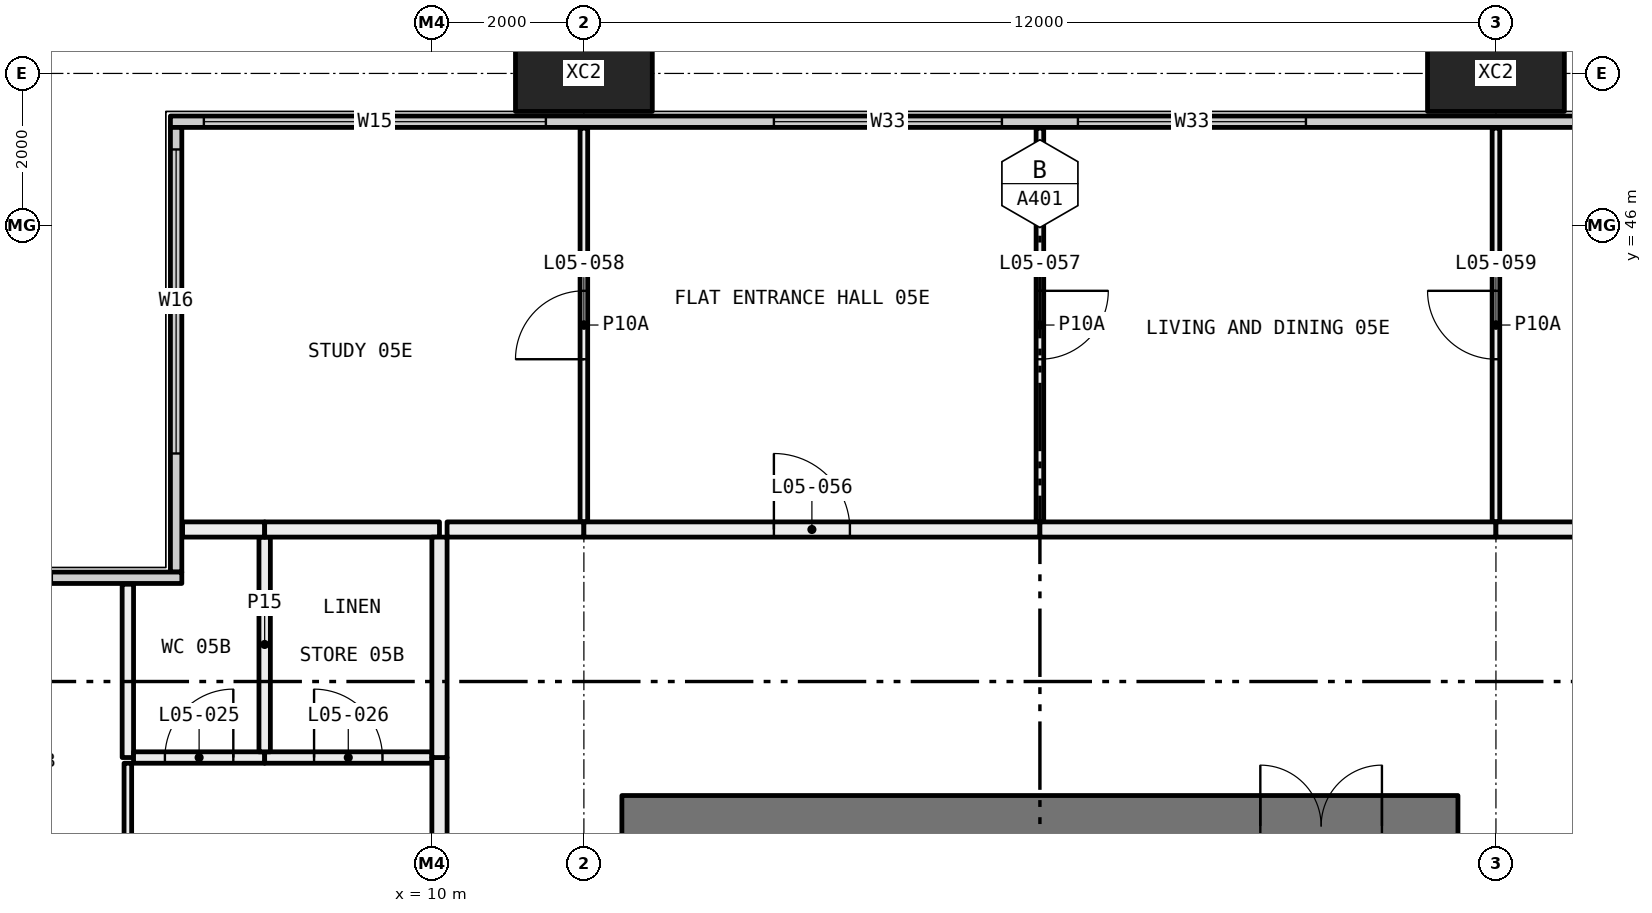
"""IFC4 building model, lengths in metres.
Left out: names, types, materials, properties, quantities, classifications, styles, units other than length and angle.
Written with IfcOpenShell. Run it as: python <this file> out.ifc"""

import sys

from ifc_helpers import new_model, si_unit, direction, frame, frame_2d, origin, origin_2d, place, context, subcontext, project, spatial, rectangle, hollow_rectangle, extrude, element, fill, save


model = new_model("IFC4")
c1 = context("Model", 3, precision=1e-05, world=origin(), true_north=direction((0.0, 1.0)))
c2 = subcontext(c1, "Body", "Model", "MODEL_VIEW")
j1 = project(units=[si_unit("LENGTHUNIT", "METRE"), si_unit("PLANEANGLEUNIT", "RADIAN")], contexts=[c1])
p1 = place(None, origin())
s1 = spatial("IfcSite", under=j1, at=p1, CompositionType="ELEMENT")
p2 = place(p1, origin())
s2 = spatial("IfcBuilding", under=s1, at=p2, CompositionType="ELEMENT")
p3 = place(p2, frame((0.0, 0.0, 30.0)))
s3 = spatial("IfcBuildingStorey", under=s2, at=p3, CompositionType="ELEMENT", Elevation=30.0)
for number, where, z_axis, x_axis in (
    (1, (12.0, 48.0, -0.4), (0.0, 0.0, 1.0), (1.0, 0.0, 0.0)),
    (2, (24.0, 48.0, -0.4), (0.0, 0.0, 1.0), (1.0, 0.0, 0.0)),
):
    element("IfcColumn", number, at=place(p3, frame(where, z_axis=z_axis, x_axis=x_axis)), inside=s3, PredefinedType="COLUMN", context=c2, shape_type="SweptSolid", body=[
        extrude(hollow_rectangle(XDim=1.8, YDim=1.0, WallThickness=0.07, at=origin_2d()), origin(), (0.0, 0.0, 1.0), 3.45),
    ])
p4 = place(p3, frame((6.56, 47.365, 0.0), z_axis=(0.0, 0.0, 1.0), x_axis=(1.0, 0.0, 0.0)))
e3 = element("IfcWall", 3, at=p4, inside=s3, PredefinedType="ELEMENTEDWALL", context=c2, shape_type="SweptSolid", body=[
    extrude(rectangle(XDim=58.88, YDim=0.15, at=frame_2d((29.44, 0.0))), origin(), (0.0, 0.0, 1.0), 3.05),
])
p5 = place(p4, frame((0.44, 0.0, 0.45)))
e4 = element("IfcOpeningElement", 4, at=p5, cuts=e3, PredefinedType="OPENING", context=c2, shape_type="SweptSolid", body=[
    extrude(rectangle(XDim=4.5, YDim=2.55, at=frame_2d((2.25, 1.275))), frame((0.0, 0.085, 0.0), z_axis=(0.0, -1.0, 0.0), x_axis=(1.0, 0.0, 0.0)), (0.0, 0.0, 1.0), 0.17),
])
p6 = place(p4, frame((7.94, 0.0, 0.45)))
e5 = element("IfcOpeningElement", 5, at=p6, cuts=e3, PredefinedType="OPENING", context=c2, shape_type="SweptSolid", body=[
    extrude(rectangle(XDim=3.0, YDim=2.55, at=frame_2d((1.5, 1.275))), frame((0.0, 0.085, 0.0), z_axis=(0.0, -1.0, 0.0), x_axis=(1.0, 0.0, 0.0)), (0.0, 0.0, 1.0), 0.17),
])
p7 = place(p4, frame((11.94, 0.0, 0.45)))
e6 = element("IfcOpeningElement", 6, at=p7, cuts=e3, PredefinedType="OPENING", context=c2, shape_type="SweptSolid", body=[
    extrude(rectangle(XDim=3.0, YDim=2.55, at=frame_2d((1.5, 1.275))), frame((0.0, 0.085, 0.0), z_axis=(0.0, -1.0, 0.0), x_axis=(1.0, 0.0, 0.0)), (0.0, 0.0, 1.0), 0.17),
])
p8 = place(p4, frame((19.94, 0.0, 0.45)))
e7 = element("IfcOpeningElement", 7, at=p8, cuts=e3, PredefinedType="OPENING", context=c2, shape_type="SweptSolid", body=[
    extrude(rectangle(XDim=3.0, YDim=2.55, at=frame_2d((1.5, 1.275))), frame((0.0, 0.085, 0.0), z_axis=(0.0, -1.0, 0.0), x_axis=(1.0, 0.0, 0.0)), (0.0, 0.0, 1.0), 0.17),
])
p9 = place(p4, frame((23.94, 0.0, 0.45)))
e8 = element("IfcOpeningElement", 8, at=p9, cuts=e3, PredefinedType="OPENING", context=c2, shape_type="SweptSolid", body=[
    extrude(rectangle(XDim=2.0, YDim=2.55, at=frame_2d((1.0, 1.275))), frame((0.0, 0.085, 0.0), z_axis=(0.0, -1.0, 0.0), x_axis=(1.0, 0.0, 0.0)), (0.0, 0.0, 1.0), 0.17),
])
p10 = place(p4, frame((31.94, 0.0, 0.45)))
e9 = element("IfcOpeningElement", 9, at=p10, cuts=e3, PredefinedType="OPENING", context=c2, shape_type="SweptSolid", body=[
    extrude(rectangle(XDim=3.0, YDim=2.55, at=frame_2d((1.5, 1.275))), frame((0.0, 0.085, 0.0), z_axis=(0.0, -1.0, 0.0), x_axis=(1.0, 0.0, 0.0)), (0.0, 0.0, 1.0), 0.17),
])
p11 = place(p4, frame((35.94, 0.0, 0.45)))
e10 = element("IfcOpeningElement", 10, at=p11, cuts=e3, PredefinedType="OPENING", context=c2, shape_type="SweptSolid", body=[
    extrude(rectangle(XDim=3.0, YDim=2.55, at=frame_2d((1.5, 1.275))), frame((0.0, 0.085, 0.0), z_axis=(0.0, -1.0, 0.0), x_axis=(1.0, 0.0, 0.0)), (0.0, 0.0, 1.0), 0.17),
])
p12 = place(p4, frame((43.94, 0.0, 0.45)))
e11 = element("IfcOpeningElement", 11, at=p12, cuts=e3, PredefinedType="OPENING", context=c2, shape_type="SweptSolid", body=[
    extrude(rectangle(XDim=3.0, YDim=2.55, at=frame_2d((1.5, 1.275))), frame((0.0, 0.085, 0.0), z_axis=(0.0, -1.0, 0.0), x_axis=(1.0, 0.0, 0.0)), (0.0, 0.0, 1.0), 0.17),
])
p13 = place(p4, frame((47.94, 0.0, 0.45)))
e12 = element("IfcOpeningElement", 12, at=p13, cuts=e3, PredefinedType="OPENING", context=c2, shape_type="SweptSolid", body=[
    extrude(rectangle(XDim=2.0, YDim=2.55, at=frame_2d((1.0, 1.275))), frame((0.0, 0.085, 0.0), z_axis=(0.0, -1.0, 0.0), x_axis=(1.0, 0.0, 0.0)), (0.0, 0.0, 1.0), 0.17),
])
p14 = place(p4, frame((53.94, 0.0, 0.45)))
e13 = element("IfcOpeningElement", 13, at=p14, cuts=e3, PredefinedType="OPENING", context=c2, shape_type="SweptSolid", body=[
    extrude(rectangle(XDim=4.5, YDim=2.55, at=frame_2d((2.25, 1.275))), frame((0.0, 0.085, 0.0), z_axis=(0.0, -1.0, 0.0), x_axis=(1.0, 0.0, 0.0)), (0.0, 0.0, 1.0), 0.17),
])
p15 = place(p3, frame((6.635, 41.44, 0.0), z_axis=(0.0, 0.0, 1.0), x_axis=(0.0, 1.0, 0.0)))
e14 = element("IfcWall", 14, at=p15, inside=s3, PredefinedType="ELEMENTEDWALL", context=c2, shape_type="SweptSolid", body=[
    extrude(rectangle(XDim=5.85, YDim=0.15, at=frame_2d((2.925, 0.0))), origin(), (0.0, 0.0, 1.0), 3.05),
])
p16 = place(p15, frame((1.56, 0.0, 0.45)))
e15 = element("IfcOpeningElement", 15, at=p16, cuts=e14, PredefinedType="OPENING", context=c2, shape_type="SweptSolid", body=[
    extrude(rectangle(XDim=4.0, YDim=2.55, at=frame_2d((2.0, 1.275))), frame((0.0, 0.085, 0.0), z_axis=(0.0, -1.0, 0.0), x_axis=(1.0, 0.0, 0.0)), (0.0, 0.0, 1.0), 0.17),
])
p17 = place(p3, frame((0.56, 41.365, 0.0), z_axis=(0.0, 0.0, 1.0), x_axis=(1.0, 0.0, 0.0)))
e16 = element("IfcWall", 16, at=p17, inside=s3, PredefinedType="ELEMENTEDWALL", context=c2, shape_type="SweptSolid", body=[
    extrude(rectangle(XDim=6.15, YDim=0.15, at=frame_2d((3.075, 0.0))), origin(), (0.0, 0.0, 1.0), 3.05),
])
p18 = place(p17, frame((0.44, 0.0, 0.45)))
e17 = element("IfcOpeningElement", 17, at=p18, cuts=e16, PredefinedType="OPENING", context=c2, shape_type="SweptSolid", body=[
    extrude(rectangle(XDim=4.0, YDim=2.55, at=frame_2d((2.0, 1.275))), frame((0.0, 0.085, 0.0), z_axis=(0.0, -1.0, 0.0), x_axis=(1.0, 0.0, 0.0)), (0.0, 0.0, 1.0), 0.17),
])
p19 = place(p3, frame((6.0, 36.05, 0.0), z_axis=(0.0, 0.0, 1.0), x_axis=(0.0, 1.0, 0.0)))
e18 = element("IfcWall", 18, at=p19, inside=s3, PredefinedType="PARTITIONING", context=c2, shape_type="SweptSolid", body=[
    extrude(rectangle(XDim=2.875, YDim=0.1, at=frame_2d((1.438, 0.0))), origin(), (0.0, 0.0, 1.0), 2.45),
])
p20 = place(p3, frame((6.0, 39.0, 0.0), z_axis=(0.0, 0.0, 1.0), x_axis=(0.0, 1.0, 0.0)))
e19 = element("IfcWall", 19, at=p20, inside=s3, PredefinedType="PARTITIONING", context=c2, shape_type="SweptSolid", body=[
    extrude(rectangle(XDim=2.28, YDim=0.15, at=frame_2d((1.14, 0.0))), origin(), (0.0, 0.0, 1.0), 3.05),
])
p21 = place(p3, frame((7.8, 39.0, 0.0), z_axis=(0.0, 0.0, 1.0), x_axis=(-1.0, 0.0, 0.0)))
e20 = element("IfcWall", 20, at=p21, inside=s3, PredefinedType="PARTITIONING", context=c2, shape_type="SweptSolid", body=[
    extrude(rectangle(XDim=1.725, YDim=0.15, at=frame_2d((0.863, 0.0))), origin(), (0.0, 0.0, 1.0), 3.05),
])
p22 = place(p21, frame((0.413, 0.0, 0.0)))
e21 = element("IfcOpeningElement", 21, at=p22, cuts=e20, PredefinedType="OPENING", context=c2, shape_type="SweptSolid", body=[
    extrude(rectangle(XDim=0.9, YDim=2.1, at=frame_2d((0.45, 1.05))), frame((0.0, 0.085, 0.0), z_axis=(0.0, -1.0, 0.0), x_axis=(1.0, 0.0, 0.0)), (0.0, 0.0, 1.0), 0.17),
])
p23 = place(p3, frame((10.0, 39.0, 0.0), z_axis=(0.0, 0.0, 1.0), x_axis=(-1.0, 0.0, 0.0)))
e22 = element("IfcWall", 22, at=p23, inside=s3, PredefinedType="PARTITIONING", context=c2, shape_type="SweptSolid", body=[
    extrude(rectangle(XDim=2.2, YDim=0.15, at=frame_2d((1.1, 0.0))), origin(), (0.0, 0.0, 1.0), 3.05),
])
p24 = place(p23, frame((0.65, 0.0, 0.0)))
e23 = element("IfcOpeningElement", 23, at=p24, cuts=e22, PredefinedType="OPENING", context=c2, shape_type="SweptSolid", body=[
    extrude(rectangle(XDim=0.9, YDim=2.1, at=frame_2d((0.45, 1.05))), frame((0.0, 0.085, 0.0), z_axis=(0.0, -1.0, 0.0), x_axis=(1.0, 0.0, 0.0)), (0.0, 0.0, 1.0), 0.17),
])
p25 = place(p3, frame((10.1, 36.1, 0.0), z_axis=(0.0, 0.0, 1.0), x_axis=(0.0, 1.0, 0.0)))
e24 = element("IfcWall", 24, at=p25, inside=s3, PredefinedType="PARTITIONING", context=c2, shape_type="SweptSolid", body=[
    extrude(rectangle(XDim=2.9, YDim=0.2, at=frame_2d((1.45, 0.0))), origin(), (0.0, 0.0, 1.0), 3.05),
])
p26 = place(p3, frame((7.8, 39.075, 0.0), z_axis=(0.0, 0.0, 1.0), x_axis=(0.0, 1.0, 0.0)))
e25 = element("IfcWall", 25, at=p26, inside=s3, PredefinedType="PARTITIONING", context=c2, shape_type="SweptSolid", body=[
    extrude(rectangle(XDim=2.825, YDim=0.15, at=frame_2d((1.413, 0.0))), origin(), (0.0, 0.0, 1.0), 3.05),
])
p27 = place(p3, frame((7.8, 42.0, 0.0), z_axis=(0.0, 0.0, 1.0), x_axis=(-1.0, 0.0, 0.0)))
e26 = element("IfcWall", 26, at=p27, inside=s3, PredefinedType="PARTITIONING", context=c2, shape_type="SweptSolid", body=[
    extrude(rectangle(XDim=1.08, YDim=0.2, at=frame_2d((0.54, 0.0))), origin(), (0.0, 0.0, 1.0), 3.05),
])
p28 = place(p3, frame((10.1, 42.0, 0.0), z_axis=(0.0, 0.0, 1.0), x_axis=(-1.0, 0.0, 0.0)))
e27 = element("IfcWall", 27, at=p28, inside=s3, PredefinedType="PARTITIONING", context=c2, shape_type="SweptSolid", body=[
    extrude(rectangle(XDim=2.3, YDim=0.2, at=frame_2d((1.15, 0.0))), origin(), (0.0, 0.0, 1.0), 3.05),
])
p29 = place(p3, frame((10.1, 39.0, 0.0), z_axis=(0.0, 0.0, 1.0), x_axis=(0.0, 1.0, 0.0)))
e28 = element("IfcWall", 28, at=p29, inside=s3, PredefinedType="PARTITIONING", context=c2, shape_type="SweptSolid", body=[
    extrude(rectangle(XDim=2.9, YDim=0.2, at=frame_2d((1.45, 0.0))), origin(), (0.0, 0.0, 1.0), 3.05),
])
p30 = place(p3, frame((12.0, 42.1, 0.0), z_axis=(0.0, 0.0, 1.0), x_axis=(0.0, 1.0, 0.0)))
e29 = element("IfcWall", 29, at=p30, inside=s3, PredefinedType="PARTITIONING", context=c2, shape_type="SweptSolid", body=[
    extrude(rectangle(XDim=5.18, YDim=0.1, at=frame_2d((2.59, 0.0))), origin(), (0.0, 0.0, 1.0), 3.05),
])
p31 = place(p30, frame((2.14, 0.0, 0.0)))
e30 = element("IfcOpeningElement", 30, at=p31, cuts=e29, PredefinedType="OPENING", context=c2, shape_type="SweptSolid", body=[
    extrude(rectangle(XDim=0.9, YDim=2.1, at=frame_2d((0.45, 1.05))), frame((0.0, 0.06, 0.0), z_axis=(0.0, -1.0, 0.0), x_axis=(1.0, 0.0, 0.0)), (0.0, 0.0, 1.0), 0.12),
])
p32 = place(p3, frame((10.2, 42.0, 0.0), z_axis=(0.0, 0.0, 1.0), x_axis=(1.0, 0.0, 0.0)))
e31 = element("IfcWall", 31, at=p32, inside=s3, PredefinedType="PARTITIONING", context=c2, shape_type="SweptSolid", body=[
    extrude(rectangle(XDim=1.8, YDim=0.2, at=frame_2d((0.9, 0.0))), origin(), (0.0, 0.0, 1.0), 3.05),
])
p33 = place(p3, frame((18.0, 42.1, 0.0), z_axis=(0.0, 0.0, 1.0), x_axis=(0.0, 1.0, 0.0)))
e32 = element("IfcWall", 32, at=p33, inside=s3, PredefinedType="PARTITIONING", context=c2, shape_type="SweptSolid", body=[
    extrude(rectangle(XDim=5.18, YDim=0.1, at=frame_2d((2.59, 0.0))), origin(), (0.0, 0.0, 1.0), 3.05),
])
p34 = place(p33, frame((2.14, 0.0, 0.0)))
e33 = element("IfcOpeningElement", 33, at=p34, cuts=e32, PredefinedType="OPENING", context=c2, shape_type="SweptSolid", body=[
    extrude(rectangle(XDim=0.9, YDim=2.1, at=frame_2d((0.45, 1.05))), frame((0.0, 0.06, 0.0), z_axis=(0.0, -1.0, 0.0), x_axis=(1.0, 0.0, 0.0)), (0.0, 0.0, 1.0), 0.12),
])
p35 = place(p3, frame((12.0, 42.0, 0.0), z_axis=(0.0, 0.0, 1.0), x_axis=(1.0, 0.0, 0.0)))
e34 = element("IfcWall", 34, at=p35, inside=s3, PredefinedType="PARTITIONING", context=c2, shape_type="SweptSolid", body=[
    extrude(rectangle(XDim=6.0, YDim=0.2, at=frame_2d((3.0, 0.0))), origin(), (0.0, 0.0, 1.0), 3.05),
])
p36 = place(p35, frame((2.5, 0.0, 0.0)))
e35 = element("IfcOpeningElement", 35, at=p36, cuts=e34, PredefinedType="OPENING", context=c2, shape_type="SweptSolid", body=[
    extrude(rectangle(XDim=1.0, YDim=2.1, at=frame_2d((0.5, 1.05))), frame((0.0, 0.11, 0.0), z_axis=(0.0, -1.0, 0.0), x_axis=(1.0, 0.0, 0.0)), (0.0, 0.0, 1.0), 0.22),
])
p37 = place(p3, frame((24.0, 42.1, 0.0), z_axis=(0.0, 0.0, 1.0), x_axis=(0.0, 1.0, 0.0)))
e36 = element("IfcWall", 36, at=p37, inside=s3, PredefinedType="PARTITIONING", context=c2, shape_type="SweptSolid", body=[
    extrude(rectangle(XDim=5.18, YDim=0.1, at=frame_2d((2.59, 0.0))), origin(), (0.0, 0.0, 1.0), 3.05),
])
p38 = place(p37, frame((2.14, 0.0, 0.0)))
e37 = element("IfcOpeningElement", 37, at=p38, cuts=e36, PredefinedType="OPENING", context=c2, shape_type="SweptSolid", body=[
    extrude(rectangle(XDim=0.9, YDim=2.1, at=frame_2d((0.45, 1.05))), frame((0.0, 0.06, 0.0), z_axis=(0.0, -1.0, 0.0), x_axis=(1.0, 0.0, 0.0)), (0.0, 0.0, 1.0), 0.12),
])
p39 = place(p3, frame((18.0, 42.0, 0.0), z_axis=(0.0, 0.0, 1.0), x_axis=(1.0, 0.0, 0.0)))
e38 = element("IfcWall", 38, at=p39, inside=s3, PredefinedType="PARTITIONING", context=c2, shape_type="SweptSolid", body=[
    extrude(rectangle(XDim=6.0, YDim=0.2, at=frame_2d((3.0, 0.0))), origin(), (0.0, 0.0, 1.0), 3.05),
])
p40 = place(p3, frame((24.0, 42.0, 0.0), z_axis=(0.0, 0.0, 1.0), x_axis=(1.0, 0.0, 0.0)))
e39 = element("IfcWall", 39, at=p40, inside=s3, PredefinedType="PARTITIONING", context=c2, shape_type="SweptSolid", body=[
    extrude(rectangle(XDim=1.9, YDim=0.2, at=frame_2d((0.95, 0.0))), origin(), (0.0, 0.0, 1.0), 3.05),
])
p41 = place(p3, frame((12.5, 38.1, 0.0), z_axis=(0.0, 0.0, 1.0), x_axis=(1.0, 0.0, 0.0)))
e40 = element("IfcWall", 40, at=p41, inside=s3, PredefinedType="SHEAR", context=c2, shape_type="SweptSolid", body=[
    extrude(rectangle(XDim=11.0, YDim=0.8, at=frame_2d((5.5, 0.0))), origin(), (0.0, 0.0, 1.0), 3.05),
])
p42 = place(p41, frame((8.4, 0.0, 0.0)))
e41 = element("IfcOpeningElement", 41, at=p42, cuts=e40, PredefinedType="OPENING", context=c2, shape_type="SweptSolid", body=[
    extrude(rectangle(XDim=1.6, YDim=2.1, at=frame_2d((0.8, 1.05))), frame((0.0, 0.41, 0.0), z_axis=(0.0, -1.0, 0.0), x_axis=(1.0, 0.0, 0.0)), (0.0, 0.0, 1.0), 0.82),
])
p43 = place(p5, origin())
e42 = element("IfcWindow", 42, at=p43, inside=s3, PartitioningType="SINGLE_PANEL", PredefinedType="WINDOW", context=c2, shape_type="SweptSolid", body=[
    extrude(rectangle(XDim=4.5, YDim=2.55, at=frame_2d((2.25, 1.275))), frame((0.0, 0.03, 0.0), z_axis=(0.0, -1.0, 0.0), x_axis=(1.0, 0.0, 0.0)), (0.0, 0.0, 1.0), 0.06),
])
fill(e4, e42)
p44 = place(p6, origin())
e43 = element("IfcWindow", 43, at=p44, inside=s3, PartitioningType="SINGLE_PANEL", PredefinedType="WINDOW", context=c2, shape_type="SweptSolid", body=[
    extrude(rectangle(XDim=3.0, YDim=2.55, at=frame_2d((1.5, 1.275))), frame((0.0, 0.03, 0.0), z_axis=(0.0, -1.0, 0.0), x_axis=(1.0, 0.0, 0.0)), (0.0, 0.0, 1.0), 0.06),
])
fill(e5, e43)
p45 = place(p7, origin())
e44 = element("IfcWindow", 44, at=p45, inside=s3, PartitioningType="SINGLE_PANEL", PredefinedType="WINDOW", context=c2, shape_type="SweptSolid", body=[
    extrude(rectangle(XDim=3.0, YDim=2.55, at=frame_2d((1.5, 1.275))), frame((0.0, 0.03, 0.0), z_axis=(0.0, -1.0, 0.0), x_axis=(1.0, 0.0, 0.0)), (0.0, 0.0, 1.0), 0.06),
])
fill(e6, e44)
p46 = place(p16, origin())
e45 = element("IfcWindow", 45, at=p46, inside=s3, PartitioningType="SINGLE_PANEL", PredefinedType="WINDOW", context=c2, shape_type="SweptSolid", body=[
    extrude(rectangle(XDim=4.0, YDim=2.55, at=frame_2d((2.0, 1.275))), frame((0.0, 0.03, 0.0), z_axis=(0.0, -1.0, 0.0), x_axis=(1.0, 0.0, 0.0)), (0.0, 0.0, 1.0), 0.06),
])
fill(e15, e45)
p47 = place(p22, frame((0.9, 0.0, 0.0), x_axis=(-1.0, 0.0, 0.0)))
e46 = element("IfcDoor", 46, at=p47, inside=s3, OperationType="SINGLE_SWING_LEFT", PredefinedType="DOOR", context=c2, shape_type="SweptSolid", body=[
    extrude(rectangle(XDim=0.9, YDim=2.1, at=frame_2d((0.45, 1.05))), frame((0.0, 0.025, 0.0), z_axis=(0.0, -1.0, 0.0), x_axis=(1.0, 0.0, 0.0)), (0.0, 0.0, 1.0), 0.05),
])
fill(e21, e46)
p48 = place(p24, frame((0.9, 0.0, 0.0), x_axis=(-1.0, 0.0, 0.0)))
e47 = element("IfcDoor", 47, at=p48, inside=s3, OperationType="SINGLE_SWING_RIGHT", PredefinedType="DOOR", context=c2, shape_type="SweptSolid", body=[
    extrude(rectangle(XDim=0.9, YDim=2.1, at=frame_2d((0.45, 1.05))), frame((0.0, 0.025, 0.0), z_axis=(0.0, -1.0, 0.0), x_axis=(1.0, 0.0, 0.0)), (0.0, 0.0, 1.0), 0.05),
])
fill(e23, e47)
p49 = place(p36, origin())
e48 = element("IfcDoor", 48, at=p49, inside=s3, OperationType="SINGLE_SWING_RIGHT", PredefinedType="DOOR", context=c2, shape_type="SweptSolid", body=[
    extrude(rectangle(XDim=1.0, YDim=2.1, at=frame_2d((0.5, 1.05))), frame((0.0, 0.025, 0.0), z_axis=(0.0, -1.0, 0.0), x_axis=(1.0, 0.0, 0.0)), (0.0, 0.0, 1.0), 0.05),
])
fill(e35, e48)
p50 = place(p34, frame((0.9, 0.0, 0.0), x_axis=(-1.0, 0.0, 0.0)))
e49 = element("IfcDoor", 49, at=p50, inside=s3, OperationType="SINGLE_SWING_RIGHT", PredefinedType="DOOR", context=c2, shape_type="SweptSolid", body=[
    extrude(rectangle(XDim=0.9, YDim=2.1, at=frame_2d((0.45, 1.05))), frame((0.0, 0.025, 0.0), z_axis=(0.0, -1.0, 0.0), x_axis=(1.0, 0.0, 0.0)), (0.0, 0.0, 1.0), 0.05),
])
fill(e33, e49)
p51 = place(p31, origin())
e50 = element("IfcDoor", 50, at=p51, inside=s3, OperationType="SINGLE_SWING_RIGHT", PredefinedType="DOOR", context=c2, shape_type="SweptSolid", body=[
    extrude(rectangle(XDim=0.9, YDim=2.1, at=frame_2d((0.45, 1.05))), frame((0.0, 0.025, 0.0), z_axis=(0.0, -1.0, 0.0), x_axis=(1.0, 0.0, 0.0)), (0.0, 0.0, 1.0), 0.05),
])
fill(e30, e50)
p52 = place(p38, origin())
e51 = element("IfcDoor", 51, at=p52, inside=s3, OperationType="SINGLE_SWING_LEFT", PredefinedType="DOOR", context=c2, shape_type="SweptSolid", body=[
    extrude(rectangle(XDim=0.9, YDim=2.1, at=frame_2d((0.45, 1.05))), frame((0.0, 0.025, 0.0), z_axis=(0.0, -1.0, 0.0), x_axis=(1.0, 0.0, 0.0)), (0.0, 0.0, 1.0), 0.05),
])
fill(e37, e51)
p53 = place(p42, origin())
e52 = element("IfcDoor", 52, at=p53, inside=s3, OperationType="DOUBLE_DOOR_SINGLE_SWING", PredefinedType="DOOR", context=c2, shape_type="SweptSolid", body=[
    extrude(rectangle(XDim=1.6, YDim=2.1, at=frame_2d((0.8, 1.05))), frame((0.0, 0.025, 0.0), z_axis=(0.0, -1.0, 0.0), x_axis=(1.0, 0.0, 0.0)), (0.0, 0.0, 1.0), 0.05),
])
fill(e41, e52)
save(model, sys.argv[1])
